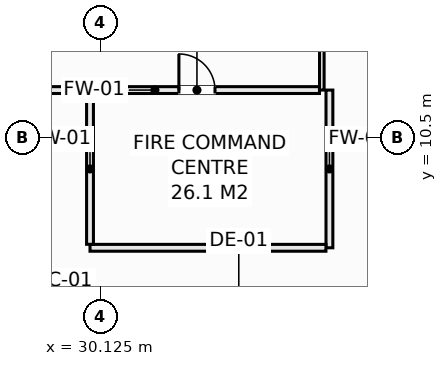
"""IFC4 building model, lengths in metres.
Left out: names, types, materials, properties, quantities, classifications, styles, units other than length and angle.
Written with IfcOpenShell. Run it as: python <this file> out.ifc"""

import sys

from ifc_helpers import new_model, si_unit, direction, frame, frame_2d, origin, place, context, subcontext, project, spatial, rectangle, extrude, element, fill, save


model = new_model("IFC4")
c1 = context("Model", 3, precision=1e-05, world=origin(), true_north=direction((0.0, 1.0)))
c2 = subcontext(c1, "Body", "Model", "MODEL_VIEW")
j1 = project(units=[si_unit("LENGTHUNIT", "METRE"), si_unit("PLANEANGLEUNIT", "RADIAN")], contexts=[c1])
p1 = place(None, origin())
s1 = spatial("IfcSite", under=j1, at=p1, CompositionType="ELEMENT")
p2 = place(p1, origin())
s2 = spatial("IfcBuilding", under=s1, at=p2, CompositionType="ELEMENT")
p3 = place(p2, origin())
s3 = spatial("IfcBuildingStorey", under=s2, at=p3, CompositionType="ELEMENT", Elevation=0.0)
p4 = place(p3, frame((35.95, 11.75, 0.0), z_axis=(0.0, 0.0, 1.0), x_axis=(0.0, 1.0, 0.0)))
e1 = element("IfcWall", 1, at=p4, inside=s3, PredefinedType="PARTITIONING", context=c2, shape_type="SweptSolid", body=[
    extrude(rectangle(XDim=3.838, YDim=0.12, at=frame_2d((1.919, 0.0))), origin(), (0.0, 0.0, 1.0), 4.74),
])
p5 = place(p3, frame((27.227, 11.75, 0.0), z_axis=(0.0, 0.0, 1.0), x_axis=(1.0, 0.0, 0.0)))
e2 = element("IfcWall", 2, at=p5, inside=s3, PredefinedType="SOLIDWALL", context=c2, shape_type="SweptSolid", body=[
    extrude(rectangle(XDim=8.661, YDim=0.18, at=frame_2d((4.331, 0.0))), origin(), (0.0, 0.0, 1.0), 4.74),
])
p6 = place(p5, frame((4.962, 0.0, 0.0)))
e3 = element("IfcOpeningElement", 3, at=p6, cuts=e2, PredefinedType="OPENING", context=c2, shape_type="SweptSolid", body=[
    extrude(rectangle(XDim=0.95, YDim=2.1, at=frame_2d((0.475, 1.05))), frame((0.0, 0.1, 0.0), z_axis=(0.0, -1.0, 0.0), x_axis=(1.0, 0.0, 0.0)), (0.0, 0.0, 1.0), 0.2),
])
p7 = place(p3, frame((36.15, 7.6, 0.0), z_axis=(0.0, 0.0, 1.0), x_axis=(0.0, 1.0, 0.0)))
e4 = element("IfcWall", 4, at=p7, inside=s3, PredefinedType="SOLIDWALL", context=c2, shape_type="SweptSolid", body=[
    extrude(rectangle(XDim=4.15, YDim=0.18, at=frame_2d((2.075, 0.0))), origin(), (0.0, 0.0, 1.0), 4.375),
])
p8 = place(p3, frame((29.85, 7.6, 0.0), z_axis=(0.0, 0.0, 1.0), x_axis=(1.0, 0.0, 0.0)))
e5 = element("IfcWall", 5, at=p8, inside=s3, PredefinedType="SOLIDWALL", context=c2, shape_type="SweptSolid", body=[
    extrude(rectangle(XDim=6.208, YDim=0.18, at=frame_2d((3.104, 0.0))), origin(), (0.0, 0.0, 1.0), 4.74),
])
p9 = place(p3, frame((29.85, 7.692, 0.0), z_axis=(0.0, 0.0, 1.0), x_axis=(0.0, 1.0, 0.0)))
e6 = element("IfcWall", 6, at=p9, inside=s3, PredefinedType="SOLIDWALL", context=c2, shape_type="SweptSolid", body=[
    extrude(rectangle(XDim=3.966, YDim=0.18, at=frame_2d((1.983, 0.0))), origin(), (0.0, 0.0, 1.0), 4.74),
])
p10 = place(p6, origin())
e7 = element("IfcDoor", 7, at=p10, inside=s3, OperationType="SINGLE_SWING_LEFT", PredefinedType="DOOR", context=c2, shape_type="SweptSolid", body=[
    extrude(rectangle(XDim=0.95, YDim=2.1, at=frame_2d((0.475, 1.05))), frame((0.0, 0.025, 0.0), z_axis=(0.0, -1.0, 0.0), x_axis=(1.0, 0.0, 0.0)), (0.0, 0.0, 1.0), 0.05),
])
fill(e3, e7)
save(model, sys.argv[1])
